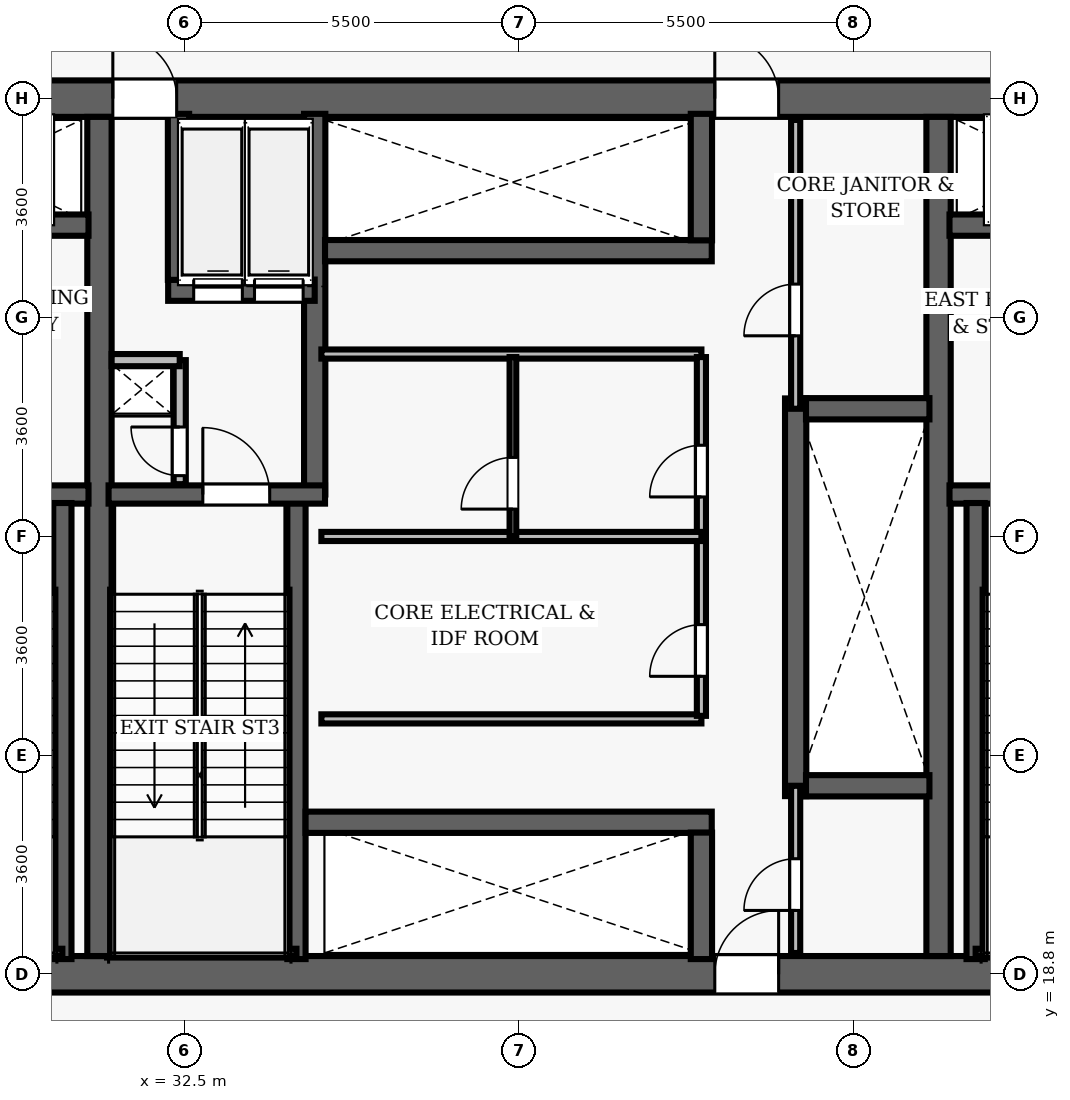
"""IFC4 building model, lengths in metres.
Left out: names, types, materials, properties, quantities, classifications, styles, units other than length and angle.
Written with IfcOpenShell. Run it as: python <this file> out.ifc"""

import sys

from ifc_helpers import new_model, si_unit, direction, frame, frame_2d, origin, place, context, subcontext, project, spatial, rectangle, extrude, element, fill, save


model = new_model("IFC4")
c1 = context("Model", 3, precision=1e-05, world=origin(), true_north=direction((0.0, 1.0)))
c2 = subcontext(c1, "Body", "Model", "MODEL_VIEW")
j1 = project(units=[si_unit("LENGTHUNIT", "METRE"), si_unit("PLANEANGLEUNIT", "RADIAN")], contexts=[c1])
p1 = place(None, origin())
s1 = spatial("IfcSite", under=j1, at=p1, CompositionType="ELEMENT")
p2 = place(p1, origin())
s2 = spatial("IfcBuilding", under=s1, at=p2, CompositionType="ELEMENT")
p3 = place(p2, frame((0.0, 0.0, 18.6)))
s3 = spatial("IfcBuildingStorey", under=s2, at=p3, CompositionType="ELEMENT", Elevation=18.6)
p4 = place(p3, frame((26.7, 18.8, 0.0), z_axis=(0.0, 0.0, 1.0), x_axis=(1.0, 0.0, 0.0)))
e1 = element("IfcWall", 1, at=p4, inside=s3, PredefinedType="SHEAR", context=c2, shape_type="SweptSolid", body=[
    extrude(rectangle(XDim=22.6, YDim=0.6, at=frame_2d((11.3, 0.0))), origin(), (0.0, 0.0, 1.0), 5.4),
])
p5 = place(p4, frame((14.52, 0.0, 0.0)))
e2 = element("IfcOpeningElement", 2, at=p5, cuts=e1, PredefinedType="OPENING", context=c2, shape_type="SweptSolid", body=[
    extrude(rectangle(XDim=1.05, YDim=2.15, at=frame_2d((0.525, 1.075))), frame((0.0, 0.31, 0.0), z_axis=(0.0, -1.0, 0.0), x_axis=(1.0, 0.0, 0.0)), (0.0, 0.0, 1.0), 0.62),
])
p6 = place(p3, frame((26.7, 33.2, 0.0), z_axis=(0.0, 0.0, 1.0), x_axis=(1.0, 0.0, 0.0)))
e3 = element("IfcWall", 3, at=p6, inside=s3, PredefinedType="SHEAR", context=c2, shape_type="SweptSolid", body=[
    extrude(rectangle(XDim=22.6, YDim=0.6, at=frame_2d((11.3, 0.0))), origin(), (0.0, 0.0, 1.0), 5.4),
])
p7 = place(p6, frame((4.62, 0.0, 0.0)))
e4 = element("IfcOpeningElement", 4, at=p7, cuts=e3, PredefinedType="OPENING", context=c2, shape_type="SweptSolid", body=[
    extrude(rectangle(XDim=1.05, YDim=2.15, at=frame_2d((0.525, 1.075))), frame((0.0, 0.31, 0.0), z_axis=(0.0, -1.0, 0.0), x_axis=(1.0, 0.0, 0.0)), (0.0, 0.0, 1.0), 0.62),
])
p8 = place(p6, frame((14.52, 0.0, 0.0)))
e5 = element("IfcOpeningElement", 5, at=p8, cuts=e3, PredefinedType="OPENING", context=c2, shape_type="SweptSolid", body=[
    extrude(rectangle(XDim=1.05, YDim=2.15, at=frame_2d((0.525, 1.075))), frame((0.0, 0.31, 0.0), z_axis=(0.0, -1.0, 0.0), x_axis=(1.0, 0.0, 0.0)), (0.0, 0.0, 1.0), 0.62),
])
for number, where, z_axis, x_axis in (
    (6, (31.1, 19.1, 0.0), (0.0, 0.0, 1.0), (0.0, 1.0, 0.0)),
    (7, (44.9, 19.1, 0.0), (0.0, 0.0, 1.0), (0.0, 1.0, 0.0)),
):
    element("IfcWall", number, at=place(p3, frame(where, z_axis=z_axis, x_axis=x_axis)), inside=s3, PredefinedType="SHEAR", context=c2, shape_type="SweptSolid", body=[
        extrude(rectangle(XDim=13.8, YDim=0.4, at=frame_2d((6.9, 0.0))), origin(), (0.0, 0.0, 1.0), 5.4),
    ])
p9 = place(p3, frame((27.25, 26.69, 0.0), z_axis=(0.0, 0.0, 1.0), x_axis=(1.0, 0.0, 0.0)))
e8 = element("IfcWall", 8, at=p9, inside=s3, PredefinedType="SHEAR", context=c2, shape_type="SweptSolid", body=[
    extrude(rectangle(XDim=3.67, YDim=0.3, at=frame_2d((1.835, 0.0))), origin(), (0.0, 0.0, 1.0), 5.4),
])
p10 = place(p9, frame((1.05, 0.0, 0.0)))
e9 = element("IfcOpeningElement", 9, at=p10, cuts=e8, PredefinedType="OPENING", context=c2, shape_type="SweptSolid", body=[
    extrude(rectangle(XDim=1.1, YDim=2.15, at=frame_2d((0.55, 1.075))), frame((0.0, 0.16, 0.0), z_axis=(0.0, -1.0, 0.0), x_axis=(1.0, 0.0, 0.0)), (0.0, 0.0, 1.0), 0.32),
])
p11 = place(p3, frame((30.49, 19.05, 0.0), z_axis=(0.0, 0.0, 1.0), x_axis=(0.0, 1.0, 0.0)))
e10 = element("IfcWall", 10, at=p11, inside=s3, PredefinedType="SHEAR", context=c2, shape_type="SweptSolid", body=[
    extrude(rectangle(XDim=7.5, YDim=0.3, at=frame_2d((3.75, 0.0))), origin(), (0.0, 0.0, 1.0), 5.4),
])
p12 = place(p3, frame((27.395, 19.16, 0.0), z_axis=(0.0, 0.0, 1.0), x_axis=(1.0, 0.0, 0.0)))
e11 = element("IfcWall", 11, at=p12, inside=s3, PredefinedType="SHEAR", context=c2, shape_type="SweptSolid", body=[
    extrude(rectangle(XDim=3.095, YDim=0.12, at=frame_2d((1.547, 0.0))), origin(), (0.0, 0.0, 1.0), 5.4),
])
p13 = place(p3, frame((27.25, 31.12, 0.0), z_axis=(0.0, 0.0, 1.0), x_axis=(1.0, 0.0, 0.0)))
e12 = element("IfcWall", 12, at=p13, inside=s3, PredefinedType="SHEAR", context=c2, shape_type="SweptSolid", body=[
    extrude(rectangle(XDim=3.67, YDim=0.35, at=frame_2d((1.835, 0.0))), origin(), (0.0, 0.0, 1.0), 4.11),
])
p14 = place(p13, frame((1.25, 0.0, 0.0)))
e13 = element("IfcOpeningElement", 13, at=p14, cuts=e12, PredefinedType="OPENING", context=c2, shape_type="SweptSolid", body=[
    extrude(rectangle(XDim=1.1, YDim=2.15, at=frame_2d((0.55, 1.075))), frame((0.0, 0.185, 0.0), z_axis=(0.0, -1.0, 0.0), x_axis=(1.0, 0.0, 0.0)), (0.0, 0.0, 1.0), 0.37),
])
p15 = place(p3, frame((45.08, 26.69, 0.0), z_axis=(0.0, 0.0, 1.0), x_axis=(1.0, 0.0, 0.0)))
e14 = element("IfcWall", 14, at=p15, inside=s3, PredefinedType="SHEAR", context=c2, shape_type="SweptSolid", body=[
    extrude(rectangle(XDim=3.67, YDim=0.3, at=frame_2d((1.835, 0.0))), origin(), (0.0, 0.0, 1.0), 5.4),
])
p16 = place(p15, frame((1.05, 0.0, 0.0)))
e15 = element("IfcOpeningElement", 15, at=p16, cuts=e14, PredefinedType="OPENING", context=c2, shape_type="SweptSolid", body=[
    extrude(rectangle(XDim=1.1, YDim=2.15, at=frame_2d((0.55, 1.075))), frame((0.0, 0.16, 0.0), z_axis=(0.0, -1.0, 0.0), x_axis=(1.0, 0.0, 0.0)), (0.0, 0.0, 1.0), 0.32),
])
p17 = place(p3, frame((45.51, 19.05, 0.0), z_axis=(0.0, 0.0, 1.0), x_axis=(0.0, 1.0, 0.0)))
e16 = element("IfcWall", 16, at=p17, inside=s3, PredefinedType="SHEAR", context=c2, shape_type="SweptSolid", body=[
    extrude(rectangle(XDim=7.5, YDim=0.3, at=frame_2d((3.75, 0.0))), origin(), (0.0, 0.0, 1.0), 5.4),
])
p18 = place(p3, frame((45.51, 19.16, 0.0), z_axis=(0.0, 0.0, 1.0), x_axis=(1.0, 0.0, 0.0)))
e17 = element("IfcWall", 17, at=p18, inside=s3, PredefinedType="SHEAR", context=c2, shape_type="SweptSolid", body=[
    extrude(rectangle(XDim=3.095, YDim=0.12, at=frame_2d((1.547, 0.0))), origin(), (0.0, 0.0, 1.0), 5.4),
])
p19 = place(p3, frame((45.08, 31.12, 0.0), z_axis=(0.0, 0.0, 1.0), x_axis=(1.0, 0.0, 0.0)))
e18 = element("IfcWall", 18, at=p19, inside=s3, PredefinedType="SHEAR", context=c2, shape_type="SweptSolid", body=[
    extrude(rectangle(XDim=3.67, YDim=0.35, at=frame_2d((1.835, 0.0))), origin(), (0.0, 0.0, 1.0), 4.11),
])
p20 = place(p19, frame((1.25, 0.0, 0.0)))
e19 = element("IfcOpeningElement", 19, at=p20, cuts=e18, PredefinedType="OPENING", context=c2, shape_type="SweptSolid", body=[
    extrude(rectangle(XDim=1.1, YDim=2.15, at=frame_2d((0.55, 1.075))), frame((0.0, 0.185, 0.0), z_axis=(0.0, -1.0, 0.0), x_axis=(1.0, 0.0, 0.0)), (0.0, 0.0, 1.0), 0.37),
])
p21 = place(p3, frame((34.34, 19.05, 0.0), z_axis=(0.0, 0.0, 1.0), x_axis=(0.0, 1.0, 0.0)))
e20 = element("IfcWall", 20, at=p21, inside=s3, PredefinedType="SHEAR", context=c2, shape_type="SweptSolid", body=[
    extrude(rectangle(XDim=7.5, YDim=0.3, at=frame_2d((3.75, 0.0))), origin(), (0.0, 0.0, 1.0), 5.4),
])
p22 = place(p3, frame((34.64, 26.69, 0.0), z_axis=(0.0, 0.0, 1.0), x_axis=(0.0, 1.0, 0.0)))
e21 = element("IfcWall", 21, at=p22, inside=s3, PredefinedType="SHEAR", context=c2, shape_type="SweptSolid", body=[
    extrude(rectangle(XDim=6.26, YDim=0.35, at=frame_2d((3.13, 0.0))), origin(), (0.0, 0.0, 1.0), 5.4),
])
p23 = place(p3, frame((31.25, 26.69, 0.0), z_axis=(0.0, 0.0, 1.0), x_axis=(1.0, 0.0, 0.0)))
e22 = element("IfcWall", 22, at=p23, inside=s3, PredefinedType="SHEAR", context=c2, shape_type="SweptSolid", body=[
    extrude(rectangle(XDim=3.56, YDim=0.3, at=frame_2d((1.78, 0.0))), origin(), (0.0, 0.0, 1.0), 5.4),
])
p24 = place(p23, frame((1.55, 0.0, 0.0)))
e23 = element("IfcOpeningElement", 23, at=p24, cuts=e22, PredefinedType="OPENING", context=c2, shape_type="SweptSolid", body=[
    extrude(rectangle(XDim=1.1, YDim=2.15, at=frame_2d((0.55, 1.075))), frame((0.0, 0.16, 0.0), z_axis=(0.0, -1.0, 0.0), x_axis=(1.0, 0.0, 0.0)), (0.0, 0.0, 1.0), 0.32),
])
p25 = place(p3, frame((31.3, 19.16, 0.0), z_axis=(0.0, 0.0, 1.0), x_axis=(1.0, 0.0, 0.0)))
e24 = element("IfcWall", 24, at=p25, inside=s3, PredefinedType="SHEAR", context=c2, shape_type="SweptSolid", body=[
    extrude(rectangle(XDim=3.04, YDim=0.12, at=frame_2d((1.52, 0.0))), origin(), (0.0, 0.0, 1.0), 5.4),
])
p26 = place(p3, frame((32.23, 30.05, 0.0), z_axis=(0.0, 0.0, 1.0), x_axis=(1.0, 0.0, 0.0)))
e25 = element("IfcWall", 25, at=p26, inside=s3, PredefinedType="SHEAR", context=c2, shape_type="SweptSolid", body=[
    extrude(rectangle(XDim=2.41, YDim=0.35, at=frame_2d((1.205, 0.0))), origin(), (0.0, 0.0, 1.0), 4.11),
])
p27 = place(p26, frame((0.42, 0.0, 0.0)))
e26 = element("IfcOpeningElement", 26, at=p27, cuts=e25, PredefinedType="OPENING", context=c2, shape_type="SweptSolid", body=[
    extrude(rectangle(XDim=0.8, YDim=2.15, at=frame_2d((0.4, 1.075))), frame((0.0, 0.185, 0.0), z_axis=(0.0, -1.0, 0.0), x_axis=(1.0, 0.0, 0.0)), (0.0, 0.0, 1.0), 0.37),
])
p28 = place(p26, frame((1.42, 0.0, 0.0)))
e27 = element("IfcOpeningElement", 27, at=p28, cuts=e25, PredefinedType="OPENING", context=c2, shape_type="SweptSolid", body=[
    extrude(rectangle(XDim=0.8, YDim=2.15, at=frame_2d((0.4, 1.075))), frame((0.0, 0.185, 0.0), z_axis=(0.0, -1.0, 0.0), x_axis=(1.0, 0.0, 0.0)), (0.0, 0.0, 1.0), 0.37),
])
p29 = place(p3, frame((32.4, 30.22, 0.0), z_axis=(0.0, 0.0, 1.0), x_axis=(0.0, 1.0, 0.0)))
e28 = element("IfcWall", 28, at=p29, inside=s3, PredefinedType="SHEAR", context=c2, shape_type="SweptSolid", body=[
    extrude(rectangle(XDim=2.73, YDim=0.35, at=frame_2d((1.365, 0.0))), origin(), (0.0, 0.0, 1.0), 4.11),
])
p30 = place(p3, frame((32.42, 26.86, 0.0), z_axis=(0.0, 0.0, 1.0), x_axis=(0.0, 1.0, 0.0)))
e29 = element("IfcWall", 29, at=p30, inside=s3, PredefinedType="PARTITIONING", context=c2, shape_type="SweptSolid", body=[
    extrude(rectangle(XDim=2.04, YDim=0.2, at=frame_2d((1.02, 0.0))), origin(), (0.0, 0.0, 1.0), 4.11),
])
p31 = place(p30, frame((0.14, 0.0, 0.0)))
e30 = element("IfcOpeningElement", 30, at=p31, cuts=e29, PredefinedType="OPENING", context=c2, shape_type="SweptSolid", body=[
    extrude(rectangle(XDim=0.8, YDim=2.05, at=frame_2d((0.4, 1.025))), frame((0.0, 0.11, 0.0), z_axis=(0.0, -1.0, 0.0), x_axis=(1.0, 0.0, 0.0)), (0.0, 0.0, 1.0), 0.22),
])
p32 = place(p3, frame((31.3, 28.9, 0.0), z_axis=(0.0, 0.0, 1.0), x_axis=(1.0, 0.0, 0.0)))
e31 = element("IfcWall", 31, at=p32, inside=s3, PredefinedType="PARTITIONING", context=c2, shape_type="SweptSolid", body=[
    extrude(rectangle(XDim=1.12, YDim=0.2, at=frame_2d((0.56, 0.0))), origin(), (0.0, 0.0, 1.0), 4.11),
])
p33 = place(p3, frame((42.55, 21.73, 0.0), z_axis=(0.0, 0.0, 1.0), x_axis=(0.0, 1.0, 0.0)))
e32 = element("IfcWall", 32, at=p33, inside=s3, PredefinedType="SHEAR", context=c2, shape_type="SweptSolid", body=[
    extrude(rectangle(XDim=6.54, YDim=0.35, at=frame_2d((3.27, 0.0))), origin(), (0.0, 0.0, 1.0), 4.11),
])
for number, where, z_axis, x_axis in (
    (33, (42.72, 21.9, 0.0), (0.0, 0.0, 1.0), (1.0, 0.0, 0.0)),
    (34, (42.72, 28.1, 0.0), (0.0, 0.0, 1.0), (1.0, 0.0, 0.0)),
):
    element("IfcWall", number, at=place(p3, frame(where, z_axis=z_axis, x_axis=x_axis)), inside=s3, PredefinedType="SHEAR", context=c2, shape_type="SweptSolid", body=[
        extrude(rectangle(XDim=2.03, YDim=0.35, at=frame_2d((1.015, 0.0))), origin(), (0.0, 0.0, 1.0), 4.11),
    ])
p34 = place(p3, frame((34.81, 30.7, 0.0), z_axis=(0.0, 0.0, 1.0), x_axis=(1.0, 0.0, 0.0)))
e35 = element("IfcWall", 35, at=p34, inside=s3, PredefinedType="SHEAR", context=c2, shape_type="SweptSolid", body=[
    extrude(rectangle(XDim=6.36, YDim=0.35, at=frame_2d((3.18, 0.0))), origin(), (0.0, 0.0, 1.0), 4.11),
])
p35 = place(p3, frame((41.0, 30.87, 0.0), z_axis=(0.0, 0.0, 1.0), x_axis=(0.0, 1.0, 0.0)))
e36 = element("IfcWall", 36, at=p35, inside=s3, PredefinedType="SHEAR", context=c2, shape_type="SweptSolid", body=[
    extrude(rectangle(XDim=2.08, YDim=0.35, at=frame_2d((1.04, 0.0))), origin(), (0.0, 0.0, 1.0), 4.11),
])
p36 = place(p3, frame((34.49, 21.3, 0.0), z_axis=(0.0, 0.0, 1.0), x_axis=(1.0, 0.0, 0.0)))
e37 = element("IfcWall", 37, at=p36, inside=s3, PredefinedType="SHEAR", context=c2, shape_type="SweptSolid", body=[
    extrude(rectangle(XDim=6.68, YDim=0.35, at=frame_2d((3.34, 0.0))), origin(), (0.0, 0.0, 1.0), 4.11),
])
p37 = place(p3, frame((41.0, 19.05, 0.0), z_axis=(0.0, 0.0, 1.0), x_axis=(0.0, 1.0, 0.0)))
e38 = element("IfcWall", 38, at=p37, inside=s3, PredefinedType="SHEAR", context=c2, shape_type="SweptSolid", body=[
    extrude(rectangle(XDim=2.08, YDim=0.35, at=frame_2d((1.04, 0.0))), origin(), (0.0, 0.0, 1.0), 4.11),
])
for number, where, z_axis, x_axis in (
    (39, (34.75, 29.0, 0.0), (0.0, 0.0, 1.0), (1.0, 0.0, 0.0)),
    (40, (34.75, 23.0, 0.0), (0.0, 0.0, 1.0), (1.0, 0.0, 0.0)),
):
    element("IfcWall", number, at=place(p3, frame(where, z_axis=z_axis, x_axis=x_axis)), inside=s3, PredefinedType="PARTITIONING", context=c2, shape_type="SweptSolid", body=[
        extrude(rectangle(XDim=6.25, YDim=0.15, at=frame_2d((3.125, 0.0))), origin(), (0.0, 0.0, 1.0), 4.11),
    ])
p38 = place(p3, frame((41.0, 23.05, 0.0), z_axis=(0.0, 0.0, 1.0), x_axis=(0.0, 1.0, 0.0)))
e41 = element("IfcWall", 41, at=p38, inside=s3, PredefinedType="PARTITIONING", context=c2, shape_type="SweptSolid", body=[
    extrude(rectangle(XDim=5.9, YDim=0.15, at=frame_2d((2.95, 0.0))), origin(), (0.0, 0.0, 1.0), 4.11),
])
p39 = place(p38, frame((0.65, 0.0, 0.0)))
e42 = element("IfcOpeningElement", 42, at=p39, cuts=e41, PredefinedType="OPENING", context=c2, shape_type="SweptSolid", body=[
    extrude(rectangle(XDim=0.85, YDim=2.1, at=frame_2d((0.425, 1.05))), frame((0.0, 0.085, 0.0), z_axis=(0.0, -1.0, 0.0), x_axis=(1.0, 0.0, 0.0)), (0.0, 0.0, 1.0), 0.17),
])
p40 = place(p38, frame((3.6, 0.0, 0.0)))
e43 = element("IfcOpeningElement", 43, at=p40, cuts=e41, PredefinedType="OPENING", context=c2, shape_type="SweptSolid", body=[
    extrude(rectangle(XDim=0.85, YDim=2.1, at=frame_2d((0.425, 1.05))), frame((0.0, 0.085, 0.0), z_axis=(0.0, -1.0, 0.0), x_axis=(1.0, 0.0, 0.0)), (0.0, 0.0, 1.0), 0.17),
])
p41 = place(p3, frame((34.75, 26.0, 0.0), z_axis=(0.0, 0.0, 1.0), x_axis=(1.0, 0.0, 0.0)))
e44 = element("IfcWall", 44, at=p41, inside=s3, PredefinedType="PARTITIONING", context=c2, shape_type="SweptSolid", body=[
    extrude(rectangle(XDim=6.25, YDim=0.15, at=frame_2d((3.125, 0.0))), origin(), (0.0, 0.0, 1.0), 4.11),
])
p42 = place(p3, frame((37.9, 26.0, 0.0), z_axis=(0.0, 0.0, 1.0), x_axis=(0.0, 1.0, 0.0)))
e45 = element("IfcWall", 45, at=p42, inside=s3, PredefinedType="PARTITIONING", context=c2, shape_type="SweptSolid", body=[
    extrude(rectangle(XDim=2.95, YDim=0.11, at=frame_2d((1.475, 0.0))), origin(), (0.0, 0.0, 1.0), 4.11),
])
p43 = place(p42, frame((0.45, 0.0, 0.0)))
e46 = element("IfcOpeningElement", 46, at=p43, cuts=e45, PredefinedType="OPENING", context=c2, shape_type="SweptSolid", body=[
    extrude(rectangle(XDim=0.85, YDim=2.1, at=frame_2d((0.425, 1.05))), frame((0.0, 0.065, 0.0), z_axis=(0.0, -1.0, 0.0), x_axis=(1.0, 0.0, 0.0)), (0.0, 0.0, 1.0), 0.13),
])
p44 = place(p3, frame((42.55, 28.1, 0.0), z_axis=(0.0, 0.0, 1.0), x_axis=(0.0, 1.0, 0.0)))
e47 = element("IfcWall", 47, at=p44, inside=s3, PredefinedType="PARTITIONING", context=c2, shape_type="SweptSolid", body=[
    extrude(rectangle(XDim=4.75, YDim=0.15, at=frame_2d((2.375, 0.0))), origin(), (0.0, 0.0, 1.0), 4.11),
])
p45 = place(p44, frame((1.2, 0.0, 0.0)))
e48 = element("IfcOpeningElement", 48, at=p45, cuts=e47, PredefinedType="OPENING", context=c2, shape_type="SweptSolid", body=[
    extrude(rectangle(XDim=0.85, YDim=2.1, at=frame_2d((0.425, 1.05))), frame((0.0, 0.085, 0.0), z_axis=(0.0, -1.0, 0.0), x_axis=(1.0, 0.0, 0.0)), (0.0, 0.0, 1.0), 0.17),
])
p46 = place(p3, frame((42.55, 19.15, 0.0), z_axis=(0.0, 0.0, 1.0), x_axis=(0.0, 1.0, 0.0)))
e49 = element("IfcWall", 49, at=p46, inside=s3, PredefinedType="PARTITIONING", context=c2, shape_type="SweptSolid", body=[
    extrude(rectangle(XDim=2.75, YDim=0.15, at=frame_2d((1.375, 0.0))), origin(), (0.0, 0.0, 1.0), 4.11),
])
p47 = place(p46, frame((0.7, 0.0, 0.0)))
e50 = element("IfcOpeningElement", 50, at=p47, cuts=e49, PredefinedType="OPENING", context=c2, shape_type="SweptSolid", body=[
    extrude(rectangle(XDim=0.85, YDim=2.1, at=frame_2d((0.425, 1.05))), frame((0.0, 0.085, 0.0), z_axis=(0.0, -1.0, 0.0), x_axis=(1.0, 0.0, 0.0)), (0.0, 0.0, 1.0), 0.17),
])
p48 = place(p24, origin())
e51 = element("IfcDoor", 51, at=p48, inside=s3, OperationType="SINGLE_SWING_LEFT", PredefinedType="DOOR", context=c2, shape_type="SweptSolid", body=[
    extrude(rectangle(XDim=1.1, YDim=2.15, at=frame_2d((0.55, 1.075))), frame((0.0, 0.025, 0.0), z_axis=(0.0, -1.0, 0.0), x_axis=(1.0, 0.0, 0.0)), (0.0, 0.0, 1.0), 0.05),
])
fill(e23, e51)
p49 = place(p31, origin())
e52 = element("IfcDoor", 52, at=p49, inside=s3, OperationType="SINGLE_SWING_RIGHT", PredefinedType="DOOR", context=c2, shape_type="SweptSolid", body=[
    extrude(rectangle(XDim=0.8, YDim=2.05, at=frame_2d((0.4, 1.025))), frame((0.0, 0.025, 0.0), z_axis=(0.0, -1.0, 0.0), x_axis=(1.0, 0.0, 0.0)), (0.0, 0.0, 1.0), 0.05),
])
fill(e30, e52)
p50 = place(p7, origin())
e53 = element("IfcDoor", 53, at=p50, inside=s3, OperationType="SINGLE_SWING_LEFT", PredefinedType="DOOR", context=c2, shape_type="SweptSolid", body=[
    extrude(rectangle(XDim=1.05, YDim=2.15, at=frame_2d((0.525, 1.075))), frame((0.0, 0.025, 0.0), z_axis=(0.0, -1.0, 0.0), x_axis=(1.0, 0.0, 0.0)), (0.0, 0.0, 1.0), 0.05),
])
fill(e4, e53)
p51 = place(p8, origin())
e54 = element("IfcDoor", 54, at=p51, inside=s3, OperationType="SINGLE_SWING_LEFT", PredefinedType="DOOR", context=c2, shape_type="SweptSolid", body=[
    extrude(rectangle(XDim=1.05, YDim=2.15, at=frame_2d((0.525, 1.075))), frame((0.0, 0.025, 0.0), z_axis=(0.0, -1.0, 0.0), x_axis=(1.0, 0.0, 0.0)), (0.0, 0.0, 1.0), 0.05),
])
fill(e5, e54)
p52 = place(p5, origin())
e55 = element("IfcDoor", 55, at=p52, inside=s3, OperationType="SINGLE_SWING_RIGHT", PredefinedType="DOOR", context=c2, shape_type="SweptSolid", body=[
    extrude(rectangle(XDim=1.05, YDim=2.15, at=frame_2d((0.525, 1.075))), frame((0.0, 0.025, 0.0), z_axis=(0.0, -1.0, 0.0), x_axis=(1.0, 0.0, 0.0)), (0.0, 0.0, 1.0), 0.05),
])
fill(e2, e55)
p53 = place(p39, origin())
e56 = element("IfcDoor", 56, at=p53, inside=s3, OperationType="SINGLE_SWING_LEFT", PredefinedType="DOOR", context=c2, shape_type="SweptSolid", body=[
    extrude(rectangle(XDim=0.85, YDim=2.1, at=frame_2d((0.425, 1.05))), frame((0.0, 0.025, 0.0), z_axis=(0.0, -1.0, 0.0), x_axis=(1.0, 0.0, 0.0)), (0.0, 0.0, 1.0), 0.05),
])
fill(e42, e56)
p54 = place(p40, origin())
e57 = element("IfcDoor", 57, at=p54, inside=s3, OperationType="SINGLE_SWING_LEFT", PredefinedType="DOOR", context=c2, shape_type="SweptSolid", body=[
    extrude(rectangle(XDim=0.85, YDim=2.1, at=frame_2d((0.425, 1.05))), frame((0.0, 0.025, 0.0), z_axis=(0.0, -1.0, 0.0), x_axis=(1.0, 0.0, 0.0)), (0.0, 0.0, 1.0), 0.05),
])
fill(e43, e57)
p55 = place(p43, origin())
e58 = element("IfcDoor", 58, at=p55, inside=s3, OperationType="SINGLE_SWING_LEFT", PredefinedType="DOOR", context=c2, shape_type="SweptSolid", body=[
    extrude(rectangle(XDim=0.85, YDim=2.1, at=frame_2d((0.425, 1.05))), frame((0.0, 0.025, 0.0), z_axis=(0.0, -1.0, 0.0), x_axis=(1.0, 0.0, 0.0)), (0.0, 0.0, 1.0), 0.05),
])
fill(e46, e58)
p56 = place(p45, origin())
e59 = element("IfcDoor", 59, at=p56, inside=s3, OperationType="SINGLE_SWING_LEFT", PredefinedType="DOOR", context=c2, shape_type="SweptSolid", body=[
    extrude(rectangle(XDim=0.85, YDim=2.1, at=frame_2d((0.425, 1.05))), frame((0.0, 0.025, 0.0), z_axis=(0.0, -1.0, 0.0), x_axis=(1.0, 0.0, 0.0)), (0.0, 0.0, 1.0), 0.05),
])
fill(e48, e59)
p57 = place(p47, origin())
e60 = element("IfcDoor", 60, at=p57, inside=s3, OperationType="SINGLE_SWING_LEFT", PredefinedType="DOOR", context=c2, shape_type="SweptSolid", body=[
    extrude(rectangle(XDim=0.85, YDim=2.1, at=frame_2d((0.425, 1.05))), frame((0.0, 0.025, 0.0), z_axis=(0.0, -1.0, 0.0), x_axis=(1.0, 0.0, 0.0)), (0.0, 0.0, 1.0), 0.05),
])
fill(e50, e60)
p58 = place(p27, origin())
e61 = element("IfcDoor", 61, at=p58, inside=s3, OperationType="SLIDING_TO_LEFT", PredefinedType="DOOR", context=c2, shape_type="SweptSolid", body=[
    extrude(rectangle(XDim=0.8, YDim=2.15, at=frame_2d((0.4, 1.075))), frame((0.0, 0.025, 0.0), z_axis=(0.0, -1.0, 0.0), x_axis=(1.0, 0.0, 0.0)), (0.0, 0.0, 1.0), 0.05),
])
fill(e26, e61)
p59 = place(p28, origin())
e62 = element("IfcDoor", 62, at=p59, inside=s3, OperationType="SLIDING_TO_LEFT", PredefinedType="DOOR", context=c2, shape_type="SweptSolid", body=[
    extrude(rectangle(XDim=0.8, YDim=2.15, at=frame_2d((0.4, 1.075))), frame((0.0, 0.025, 0.0), z_axis=(0.0, -1.0, 0.0), x_axis=(1.0, 0.0, 0.0)), (0.0, 0.0, 1.0), 0.05),
])
fill(e27, e62)
save(model, sys.argv[1])
